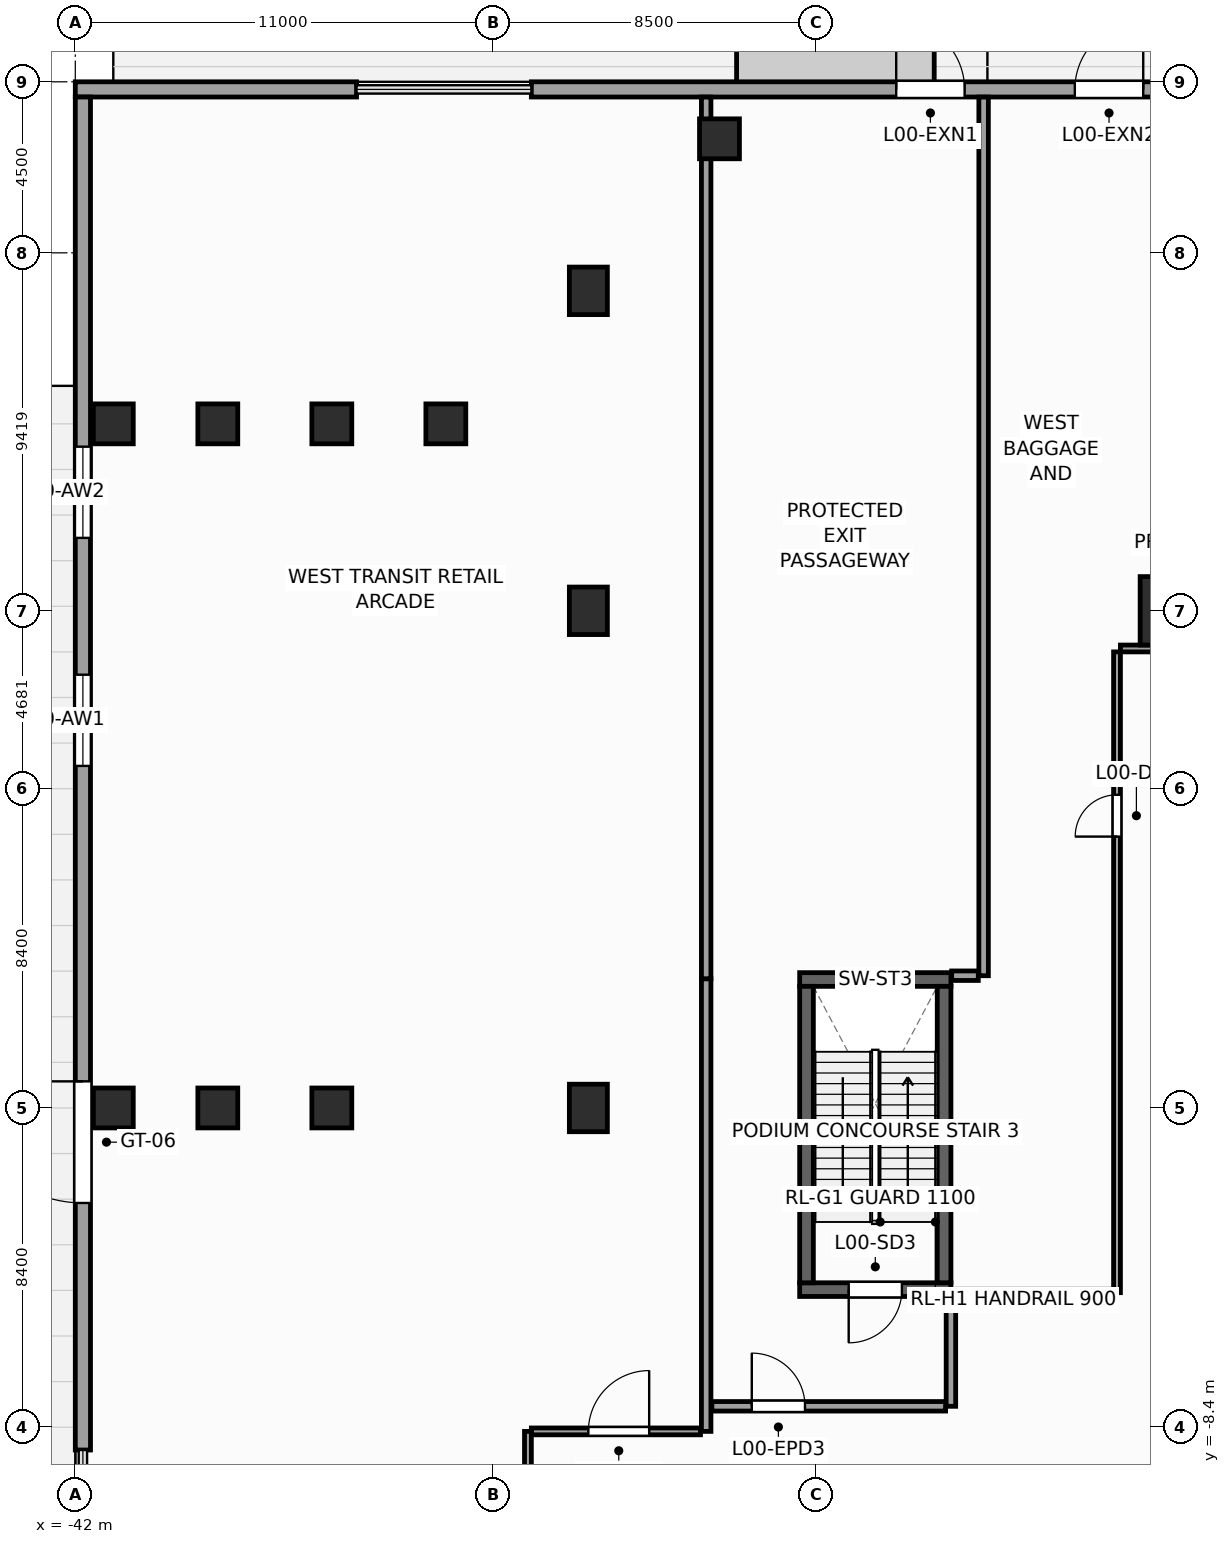
"""IFC4 building model, lengths in metres.
Left out: names, types, materials, properties, quantities, classifications, styles, units other than length and angle.
Written with IfcOpenShell. Run it as: python <this file> out.ifc"""

import sys

from ifc_helpers import new_model, si_unit, direction, frame, frame_2d, origin, origin_2d, place, context, subcontext, project, spatial, rectangle, extrude, source, transform, mapped, element, fill, save


model = new_model("IFC4")
c1 = context("Model", 3, precision=1e-05, world=origin(), true_north=direction((0.0, 1.0)))
c2 = subcontext(c1, "Body", "Model", "MODEL_VIEW")
j1 = project(units=[si_unit("LENGTHUNIT", "METRE"), si_unit("PLANEANGLEUNIT", "RADIAN")], contexts=[c1])
p1 = place(None, origin())
s1 = spatial("IfcSite", under=j1, at=p1, CompositionType="ELEMENT")
p2 = place(p1, origin())
s2 = spatial("IfcBuilding", under=s1, at=p2, CompositionType="ELEMENT")
p3 = place(p2, origin())
s3 = spatial("IfcBuildingStorey", under=s2, at=p3, CompositionType="ELEMENT", Elevation=0.0)
p4 = place(p3, frame((-22.94, -4.78, 0.0), z_axis=(0.0, 0.0, 1.0), x_axis=(1.0, 0.0, 0.0)))
e1 = element("IfcWall", 1, at=p4, inside=s3, PredefinedType="SHEAR", context=c2, shape_type="SweptSolid", body=[
    extrude(rectangle(XDim=3.98, YDim=0.36, at=frame_2d((1.99, 0.0))), origin(), (0.0, 0.0, 1.0), 6.0),
])
p5 = place(p4, frame((1.29, 0.0, 0.0)))
e2 = element("IfcOpeningElement", 2, at=p5, cuts=e1, PredefinedType="OPENING", context=c2, shape_type="SweptSolid", body=[
    extrude(rectangle(XDim=1.4, YDim=2.2, at=frame_2d((0.7, 1.1))), frame((0.0, 0.19, 0.0), z_axis=(0.0, -1.0, 0.0), x_axis=(1.0, 0.0, 0.0)), (0.0, 0.0, 1.0), 0.38),
])
p6 = place(p3, frame((-22.94, 3.38, 0.0), z_axis=(0.0, 0.0, 1.0), x_axis=(1.0, 0.0, 0.0)))
e3 = element("IfcWall", 3, at=p6, inside=s3, PredefinedType="SHEAR", context=c2, shape_type="SweptSolid", body=[
    extrude(rectangle(XDim=3.98, YDim=0.36, at=frame_2d((1.99, 0.0))), origin(), (0.0, 0.0, 1.0), 6.0),
])
for number, where, z_axis, x_axis in (
    (4, (-22.76, -4.6, 0.0), (0.0, 0.0, 1.0), (0.0, 1.0, 0.0)),
    (5, (-19.14, -4.6, 0.0), (0.0, 0.0, 1.0), (0.0, 1.0, 0.0)),
):
    element("IfcWall", number, at=place(p3, frame(where, z_axis=z_axis, x_axis=x_axis)), inside=s3, PredefinedType="SHEAR", context=c2, shape_type="SweptSolid", body=[
        extrude(rectangle(XDim=7.8, YDim=0.36, at=frame_2d((3.9, 0.0))), origin(), (0.0, 0.0, 1.0), 6.0),
    ])
m1 = source(origin(), c2, "Body", "SweptSolid", [
    extrude(rectangle(XDim=1.8, YDim=1.8, at=origin_2d()), origin(), (0.0, 0.0, 1.0), 6.0),
])
p7 = place(p3, frame((-13.081, 13.081, 0.0), z_axis=(0.0, 0.0, 1.0), x_axis=(1.0, 0.0, 0.0)))
e6 = element("IfcColumn", 6, at=p7, inside=s3, PredefinedType="COLUMN", context=c2, shape_type="MappedRepresentation", body=[
    mapped(m1, transform((0.0, 0.0, 0.0), scale=1.0)),
])
m2 = source(origin(), c2, "Body", "SweptSolid", [
    extrude(rectangle(XDim=1.0, YDim=1.25, at=origin_2d()), origin(), (0.0, 0.0, 1.0), 6.0),
])
for number, where, z_axis, x_axis in (
    (7, (-28.5, 21.5, 0.0), (0.0, 0.0, 1.0), (1.0, 0.0, 0.0)),
    (8, (-28.5, 0.0, 0.0), (0.0, 0.0, 1.0), (1.0, 0.0, 0.0)),
    (9, (-28.5, 13.081, 0.0), (0.0, 0.0, 1.0), (1.0, 0.0, 0.0)),
):
    element("IfcColumn", number, at=place(p3, frame(where, z_axis=z_axis, x_axis=x_axis)), inside=s3, PredefinedType="COLUMN", context=c2, shape_type="MappedRepresentation", body=[
        mapped(m2, transform((0.0, 0.0, 0.0), scale=1.0)),
    ])
m3 = source(origin(), c2, "Body", "SweptSolid", [
    extrude(rectangle(XDim=1.05, YDim=1.05, at=origin_2d()), origin(), (0.0, 0.0, 1.0), 6.0),
])
for number, where, z_axis, x_axis in (
    (10, (-25.05, 25.5, 0.0), (0.0, 0.0, 1.0), (1.0, 0.0, 0.0)),
    (11, (-32.25, 18.0, 0.0), (0.0, 0.0, 1.0), (1.0, 0.0, 0.0)),
    (12, (-35.25, 0.0, 0.0), (0.0, 0.0, 1.0), (1.0, 0.0, 0.0)),
    (13, (-35.25, 18.0, 0.0), (0.0, 0.0, 1.0), (1.0, 0.0, 0.0)),
    (14, (-38.25, 0.0, 0.0), (0.0, 0.0, 1.0), (1.0, 0.0, 0.0)),
    (15, (-38.25, 18.0, 0.0), (0.0, 0.0, 1.0), (1.0, 0.0, 0.0)),
    (16, (-41.0, 0.0, 0.0), (0.0, 0.0, 1.0), (1.0, 0.0, 0.0)),
    (17, (-41.0, 18.0, 0.0), (0.0, 0.0, 1.0), (1.0, 0.0, 0.0)),
):
    element("IfcColumn", number, at=place(p3, frame(where, z_axis=z_axis, x_axis=x_axis)), inside=s3, PredefinedType="COLUMN", context=c2, shape_type="MappedRepresentation", body=[
        mapped(m3, transform((0.0, 0.0, 0.0), scale=1.0)),
    ])
p8 = place(p3, frame((-42.0, 26.8, 0.0), z_axis=(0.0, 0.0, 1.0), x_axis=(1.0, 0.0, 0.0)))
e18 = element("IfcWall", 18, at=p8, inside=s3, PredefinedType="STANDARD", context=c2, shape_type="SweptSolid", body=[
    extrude(rectangle(XDim=7.4, YDim=0.4, at=frame_2d((3.7, 0.0))), origin(), (0.0, 0.0, 1.0), 5.66),
])
p9 = place(p3, frame((-30.0, 26.8, 0.0), z_axis=(0.0, 0.0, 1.0), x_axis=(1.0, 0.0, 0.0)))
e19 = element("IfcWall", 19, at=p9, inside=s3, PredefinedType="STANDARD", context=c2, shape_type="SweptSolid", body=[
    extrude(rectangle(XDim=50.0, YDim=0.4, at=frame_2d((25.0, 0.0))), origin(), (0.0, 0.0, 1.0), 5.66),
])
p10 = place(p9, frame((9.6, 0.0, 0.0)))
e20 = element("IfcOpeningElement", 20, at=p10, cuts=e19, PredefinedType="OPENING", context=c2, shape_type="SweptSolid", body=[
    extrude(rectangle(XDim=1.8, YDim=2.4, at=frame_2d((0.9, 1.2))), frame((0.0, 0.21, 0.0), z_axis=(0.0, -1.0, 0.0), x_axis=(1.0, 0.0, 0.0)), (0.0, 0.0, 1.0), 0.42),
])
p11 = place(p9, frame((14.3, 0.0, 0.0)))
e21 = element("IfcOpeningElement", 21, at=p11, cuts=e19, PredefinedType="OPENING", context=c2, shape_type="SweptSolid", body=[
    extrude(rectangle(XDim=1.8, YDim=2.4, at=frame_2d((0.9, 1.2))), frame((0.0, 0.21, 0.0), z_axis=(0.0, -1.0, 0.0), x_axis=(1.0, 0.0, 0.0)), (0.0, 0.0, 1.0), 0.42),
])
p12 = place(p9, frame((18.925, 0.0, 0.0)))
e22 = element("IfcOpeningElement", 22, at=p12, cuts=e19, PredefinedType="OPENING", context=c2, shape_type="SweptSolid", body=[
    extrude(rectangle(XDim=1.8, YDim=2.4, at=frame_2d((0.9, 1.2))), frame((0.0, 0.21, 0.0), z_axis=(0.0, -1.0, 0.0), x_axis=(1.0, 0.0, 0.0)), (0.0, 0.0, 1.0), 0.42),
])
p13 = place(p9, frame((23.9, 0.0, 0.0)))
e23 = element("IfcOpeningElement", 23, at=p13, cuts=e19, PredefinedType="OPENING", context=c2, shape_type="SweptSolid", body=[
    extrude(rectangle(XDim=1.8, YDim=2.4, at=frame_2d((0.9, 1.2))), frame((0.0, 0.21, 0.0), z_axis=(0.0, -1.0, 0.0), x_axis=(1.0, 0.0, 0.0)), (0.0, 0.0, 1.0), 0.42),
])
p14 = place(p9, frame((34.3, 0.0, 0.0)))
e24 = element("IfcOpeningElement", 24, at=p14, cuts=e19, PredefinedType="OPENING", context=c2, shape_type="SweptSolid", body=[
    extrude(rectangle(XDim=1.8, YDim=2.4, at=frame_2d((0.9, 1.2))), frame((0.0, 0.21, 0.0), z_axis=(0.0, -1.0, 0.0), x_axis=(1.0, 0.0, 0.0)), (0.0, 0.0, 1.0), 0.42),
])
p15 = place(p9, frame((39.275, 0.0, 0.0)))
e25 = element("IfcOpeningElement", 25, at=p15, cuts=e19, PredefinedType="OPENING", context=c2, shape_type="SweptSolid", body=[
    extrude(rectangle(XDim=1.8, YDim=2.4, at=frame_2d((0.9, 1.2))), frame((0.0, 0.21, 0.0), z_axis=(0.0, -1.0, 0.0), x_axis=(1.0, 0.0, 0.0)), (0.0, 0.0, 1.0), 0.42),
])
p16 = place(p9, frame((46.6, 0.0, 0.0)))
e26 = element("IfcOpeningElement", 26, at=p16, cuts=e19, PredefinedType="OPENING", context=c2, shape_type="SweptSolid", body=[
    extrude(rectangle(XDim=1.8, YDim=2.4, at=frame_2d((0.9, 1.2))), frame((0.0, 0.21, 0.0), z_axis=(0.0, -1.0, 0.0), x_axis=(1.0, 0.0, 0.0)), (0.0, 0.0, 1.0), 0.42),
])
p17 = place(p3, frame((-41.8, -9.0, 0.0), z_axis=(0.0, 0.0, 1.0), x_axis=(0.0, 1.0, 0.0)))
e27 = element("IfcWall", 27, at=p17, inside=s3, PredefinedType="STANDARD", context=c2, shape_type="SweptSolid", body=[
    extrude(rectangle(XDim=35.6, YDim=0.4, at=frame_2d((17.8, 0.0))), origin(), (0.0, 0.0, 1.0), 5.66),
])
p18 = place(p17, frame((18.0, 0.0, 0.9)))
e28 = element("IfcOpeningElement", 28, at=p18, cuts=e27, PredefinedType="OPENING", context=c2, shape_type="SweptSolid", body=[
    extrude(rectangle(XDim=2.4, YDim=3.2, at=frame_2d((1.2, 1.6))), frame((0.0, 0.21, 0.0), z_axis=(0.0, -1.0, 0.0), x_axis=(1.0, 0.0, 0.0)), (0.0, 0.0, 1.0), 0.42),
])
p19 = place(p17, frame((24.0, 0.0, 0.9)))
e29 = element("IfcOpeningElement", 29, at=p19, cuts=e27, PredefinedType="OPENING", context=c2, shape_type="SweptSolid", body=[
    extrude(rectangle(XDim=2.4, YDim=3.2, at=frame_2d((1.2, 1.6))), frame((0.0, 0.21, 0.0), z_axis=(0.0, -1.0, 0.0), x_axis=(1.0, 0.0, 0.0)), (0.0, 0.0, 1.0), 0.42),
])
p20 = place(p17, frame((6.5, 0.0, 0.0)))
e30 = element("IfcOpeningElement", 30, at=p20, cuts=e27, PredefinedType="OPENING", context=c2, shape_type="SweptSolid", body=[
    extrude(rectangle(XDim=3.2, YDim=3.6, at=frame_2d((1.6, 1.8))), frame((0.0, 0.21, 0.0), z_axis=(0.0, -1.0, 0.0), x_axis=(1.0, 0.0, 0.0)), (0.0, 0.0, 1.0), 0.42),
])
p21 = place(p3, frame((-30.0, -8.51, 0.0), z_axis=(0.0, 0.0, 1.0), x_axis=(1.0, 0.0, 0.0)))
e31 = element("IfcWall", 31, at=p21, inside=s3, PredefinedType="PARTITIONING", context=c2, shape_type="SweptSolid", body=[
    extrude(rectangle(XDim=4.45, YDim=0.18, at=frame_2d((2.225, 0.0))), origin(), (0.0, 0.0, 1.0), 5.66),
])
p22 = place(p21, frame((1.5, 0.0, 0.0)))
e32 = element("IfcOpeningElement", 32, at=p22, cuts=e31, PredefinedType="OPENING", context=c2, shape_type="SweptSolid", body=[
    extrude(rectangle(XDim=1.6, YDim=2.5, at=frame_2d((0.8, 1.25))), frame((0.0, 0.1, 0.0), z_axis=(0.0, -1.0, 0.0), x_axis=(1.0, 0.0, 0.0)), (0.0, 0.0, 1.0), 0.2),
])
p23 = place(p3, frame((-30.09, -11.89, 0.0), z_axis=(0.0, 0.0, 1.0), x_axis=(0.0, 1.0, 0.0)))
e33 = element("IfcWall", 33, at=p23, inside=s3, PredefinedType="PARTITIONING", context=c2, shape_type="SweptSolid", body=[
    extrude(rectangle(XDim=3.38, YDim=0.18, at=frame_2d((1.69, 0.0))), origin(), (0.0, 0.0, 1.0), 5.66),
])
p24 = place(p3, frame((-18.8, -4.86, 0.0), z_axis=(0.0, 0.0, 1.0), x_axis=(1.0, 0.0, 0.0)))
e34 = element("IfcWall", 34, at=p24, inside=s3, PredefinedType="PARTITIONING", context=c2, shape_type="SweptSolid", body=[
    extrude(rectangle(XDim=4.12, YDim=0.18, at=frame_2d((2.06, 0.0))), origin(), (0.0, 0.0, 1.0), 5.66),
])
p25 = place(p3, frame((-14.59, -4.86, 0.0), z_axis=(0.0, 0.0, 1.0), x_axis=(0.0, 1.0, 0.0)))
e35 = element("IfcWall", 35, at=p25, inside=s3, PredefinedType="PARTITIONING", context=c2, shape_type="SweptSolid", body=[
    extrude(rectangle(XDim=16.86, YDim=0.18, at=frame_2d((8.43, 0.0))), origin(), (0.0, 0.0, 1.0), 5.66),
])
p26 = place(p25, frame((12.0, 0.0, 0.0)))
e36 = element("IfcOpeningElement", 36, at=p26, cuts=e35, PredefinedType="OPENING", context=c2, shape_type="SweptSolid", body=[
    extrude(rectangle(XDim=1.1, YDim=2.2, at=frame_2d((0.55, 1.1))), frame((0.0, 0.1, 0.0), z_axis=(0.0, -1.0, 0.0), x_axis=(1.0, 0.0, 0.0)), (0.0, 0.0, 1.0), 0.2),
])
p27 = place(p3, frame((-14.5, 12.09, 0.0), z_axis=(0.0, 0.0, 1.0), x_axis=(1.0, 0.0, 0.0)))
e37 = element("IfcWall", 37, at=p27, inside=s3, PredefinedType="PARTITIONING", context=c2, shape_type="SweptSolid", body=[
    extrude(rectangle(XDim=29.0, YDim=0.18, at=frame_2d((14.5, 0.0))), origin(), (0.0, 0.0, 1.0), 5.66),
])
p28 = place(p27, frame((13.7, 0.0, 0.0)))
e38 = element("IfcOpeningElement", 38, at=p28, cuts=e37, PredefinedType="OPENING", context=c2, shape_type="SweptSolid", body=[
    extrude(rectangle(XDim=1.6, YDim=2.5, at=frame_2d((0.8, 1.25))), frame((0.0, 0.1, 0.0), z_axis=(0.0, -1.0, 0.0), x_axis=(1.0, 0.0, 0.0)), (0.0, 0.0, 1.0), 0.2),
])
p29 = place(p3, frame((-25.4, -8.51, 0.0), z_axis=(0.0, 0.0, 1.0), x_axis=(0.0, 1.0, 0.0)))
e39 = element("IfcWall", 39, at=p29, inside=s3, PredefinedType="PARTITIONING", context=c2, shape_type="SweptSolid", body=[
    extrude(rectangle(XDim=11.91, YDim=0.25, at=frame_2d((5.955, 0.0))), origin(), (0.0, 0.0, 1.0), 5.66),
])
p30 = place(p3, frame((-25.4, 3.4, 0.0), z_axis=(0.0, 0.0, 1.0), x_axis=(0.0, 1.0, 0.0)))
e40 = element("IfcWall", 40, at=p30, inside=s3, PredefinedType="PARTITIONING", context=c2, shape_type="SweptSolid", body=[
    extrude(rectangle(XDim=23.198, YDim=0.25, at=frame_2d((11.599, 0.0))), origin(), (0.0, 0.0, 1.0), 5.66),
])
p31 = place(p3, frame((-25.25, -7.85, 0.0), z_axis=(0.0, 0.0, 1.0), x_axis=(1.0, 0.0, 0.0)))
e41 = element("IfcWall", 41, at=p31, inside=s3, PredefinedType="PARTITIONING", context=c2, shape_type="SweptSolid", body=[
    extrude(rectangle(XDim=6.15, YDim=0.25, at=frame_2d((3.075, 0.0))), origin(), (0.0, 0.0, 1.0), 5.66),
])
p32 = place(p31, frame((1.05, 0.0, 0.0)))
e42 = element("IfcOpeningElement", 42, at=p32, cuts=e41, PredefinedType="OPENING", context=c2, shape_type="SweptSolid", body=[
    extrude(rectangle(XDim=1.4, YDim=2.2, at=frame_2d((0.7, 1.1))), frame((0.0, 0.135, 0.0), z_axis=(0.0, -1.0, 0.0), x_axis=(1.0, 0.0, 0.0)), (0.0, 0.0, 1.0), 0.27),
])
p33 = place(p3, frame((-18.96, -7.85, 0.0), z_axis=(0.0, 0.0, 1.0), x_axis=(0.0, 1.0, 0.0)))
e43 = element("IfcWall", 43, at=p33, inside=s3, PredefinedType="PARTITIONING", context=c2, shape_type="SweptSolid", body=[
    extrude(rectangle(XDim=2.85, YDim=0.25, at=frame_2d((1.425, 0.0))), origin(), (0.0, 0.0, 1.0), 5.66),
])
p34 = place(p3, frame((-18.94, 3.48, 0.0), z_axis=(0.0, 0.0, 1.0), x_axis=(1.0, 0.0, 0.0)))
e44 = element("IfcWall", 44, at=p34, inside=s3, PredefinedType="PARTITIONING", context=c2, shape_type="SweptSolid", body=[
    extrude(rectangle(XDim=0.7, YDim=0.25, at=frame_2d((0.35, 0.0))), origin(), (0.0, 0.0, 1.0), 5.66),
])
p35 = place(p3, frame((-18.1, 3.48, 0.0), z_axis=(0.0, 0.0, 1.0), x_axis=(0.0, 1.0, 0.0)))
e45 = element("IfcWall", 45, at=p35, inside=s3, PredefinedType="PARTITIONING", context=c2, shape_type="SweptSolid", body=[
    extrude(rectangle(XDim=23.118, YDim=0.25, at=frame_2d((11.559, 0.0))), origin(), (0.0, 0.0, 1.0), 5.66),
])
m4 = source(origin(), c2, "Body", "SweptSolid", [
    extrude(rectangle(XDim=2.4, YDim=3.2, at=frame_2d((1.2, 1.6))), frame((0.0, 0.03, 0.0), z_axis=(0.0, -1.0, 0.0), x_axis=(1.0, 0.0, 0.0)), (0.0, 0.0, 1.0), 0.06),
])
p36 = place(p18, origin())
e46 = element("IfcWindow", 46, at=p36, inside=s3, PartitioningType="SINGLE_PANEL", PredefinedType="WINDOW", context=c2, shape_type="MappedRepresentation", body=[
    mapped(m4, transform((0.0, 0.0, 0.0), scale=1.0)),
])
fill(e28, e46)
p37 = place(p19, origin())
e47 = element("IfcWindow", 47, at=p37, inside=s3, PartitioningType="SINGLE_PANEL", PredefinedType="WINDOW", context=c2, shape_type="MappedRepresentation", body=[
    mapped(m4, transform((0.0, 0.0, 0.0), scale=1.0)),
])
fill(e29, e47)
m5 = source(origin(), c2, "Body", "SweptSolid", [
    extrude(rectangle(XDim=1.8, YDim=2.4, at=frame_2d((0.9, 1.2))), frame((0.0, 0.025, 0.0), z_axis=(0.0, -1.0, 0.0), x_axis=(1.0, 0.0, 0.0)), (0.0, 0.0, 1.0), 0.05),
])
p38 = place(p10, origin())
e48 = element("IfcDoor", 48, at=p38, inside=s3, OperationType="SINGLE_SWING_LEFT", PredefinedType="DOOR", context=c2, shape_type="MappedRepresentation", body=[
    mapped(m5, transform((0.0, 0.0, 0.0), scale=1.0)),
])
fill(e20, e48)
p39 = place(p11, origin())
e49 = element("IfcDoor", 49, at=p39, inside=s3, OperationType="SINGLE_SWING_RIGHT", PredefinedType="DOOR", context=c2, shape_type="MappedRepresentation", body=[
    mapped(m5, transform((0.0, 0.0, 0.0), scale=1.0)),
])
fill(e21, e49)
m6 = source(origin(), c2, "Body", "SweptSolid", [
    extrude(rectangle(XDim=3.2, YDim=3.6, at=frame_2d((1.6, 1.8))), frame((0.0, 0.025, 0.0), z_axis=(0.0, -1.0, 0.0), x_axis=(1.0, 0.0, 0.0)), (0.0, 0.0, 1.0), 0.05),
])
p40 = place(p20, origin())
e50 = element("IfcDoor", 50, at=p40, inside=s3, OperationType="SINGLE_SWING_RIGHT", PredefinedType="GATE", context=c2, shape_type="MappedRepresentation", body=[
    mapped(m6, transform((0.0, 0.0, 0.0), scale=1.0)),
])
fill(e30, e50)
m7 = source(origin(), c2, "Body", "SweptSolid", [
    extrude(rectangle(XDim=1.4, YDim=2.2, at=frame_2d((0.7, 1.1))), frame((0.0, 0.025, 0.0), z_axis=(0.0, -1.0, 0.0), x_axis=(1.0, 0.0, 0.0)), (0.0, 0.0, 1.0), 0.05),
])
p41 = place(p5, frame((1.4, 0.0, 0.0), z_axis=(0.0, 0.0, 1.0), x_axis=(-1.0, 0.0, 0.0)))
e51 = element("IfcDoor", 51, at=p41, inside=s3, OperationType="SINGLE_SWING_LEFT", PredefinedType="DOOR", context=c2, shape_type="MappedRepresentation", body=[
    mapped(m7, transform((0.0, 0.0, 0.0), scale=1.0)),
])
fill(e2, e51)
p42 = place(p32, origin())
e52 = element("IfcDoor", 52, at=p42, inside=s3, OperationType="SINGLE_SWING_LEFT", PredefinedType="DOOR", context=c2, shape_type="MappedRepresentation", body=[
    mapped(m7, transform((0.0, 0.0, 0.0), scale=1.0)),
])
fill(e42, e52)
m8 = source(origin(), c2, "Body", "SweptSolid", [
    extrude(rectangle(XDim=1.6, YDim=2.5, at=frame_2d((0.8, 1.25))), frame((0.0, 0.025, 0.0), z_axis=(0.0, -1.0, 0.0), x_axis=(1.0, 0.0, 0.0)), (0.0, 0.0, 1.0), 0.05),
])
p43 = place(p22, origin())
e53 = element("IfcDoor", 53, at=p43, inside=s3, OperationType="SINGLE_SWING_RIGHT", PredefinedType="DOOR", context=c2, shape_type="MappedRepresentation", body=[
    mapped(m8, transform((0.0, 0.0, 0.0), scale=1.0)),
])
fill(e32, e53)
m9 = source(origin(), c2, "Body", "SweptSolid", [
    extrude(rectangle(XDim=1.1, YDim=2.2, at=frame_2d((0.55, 1.1))), frame((0.0, 0.025, 0.0), z_axis=(0.0, -1.0, 0.0), x_axis=(1.0, 0.0, 0.0)), (0.0, 0.0, 1.0), 0.05),
])
p44 = place(p26, origin())
e54 = element("IfcDoor", 54, at=p44, inside=s3, OperationType="SINGLE_SWING_LEFT", PredefinedType="DOOR", context=c2, shape_type="MappedRepresentation", body=[
    mapped(m9, transform((0.0, 0.0, 0.0), scale=1.0)),
])
fill(e36, e54)
save(model, sys.argv[1])
